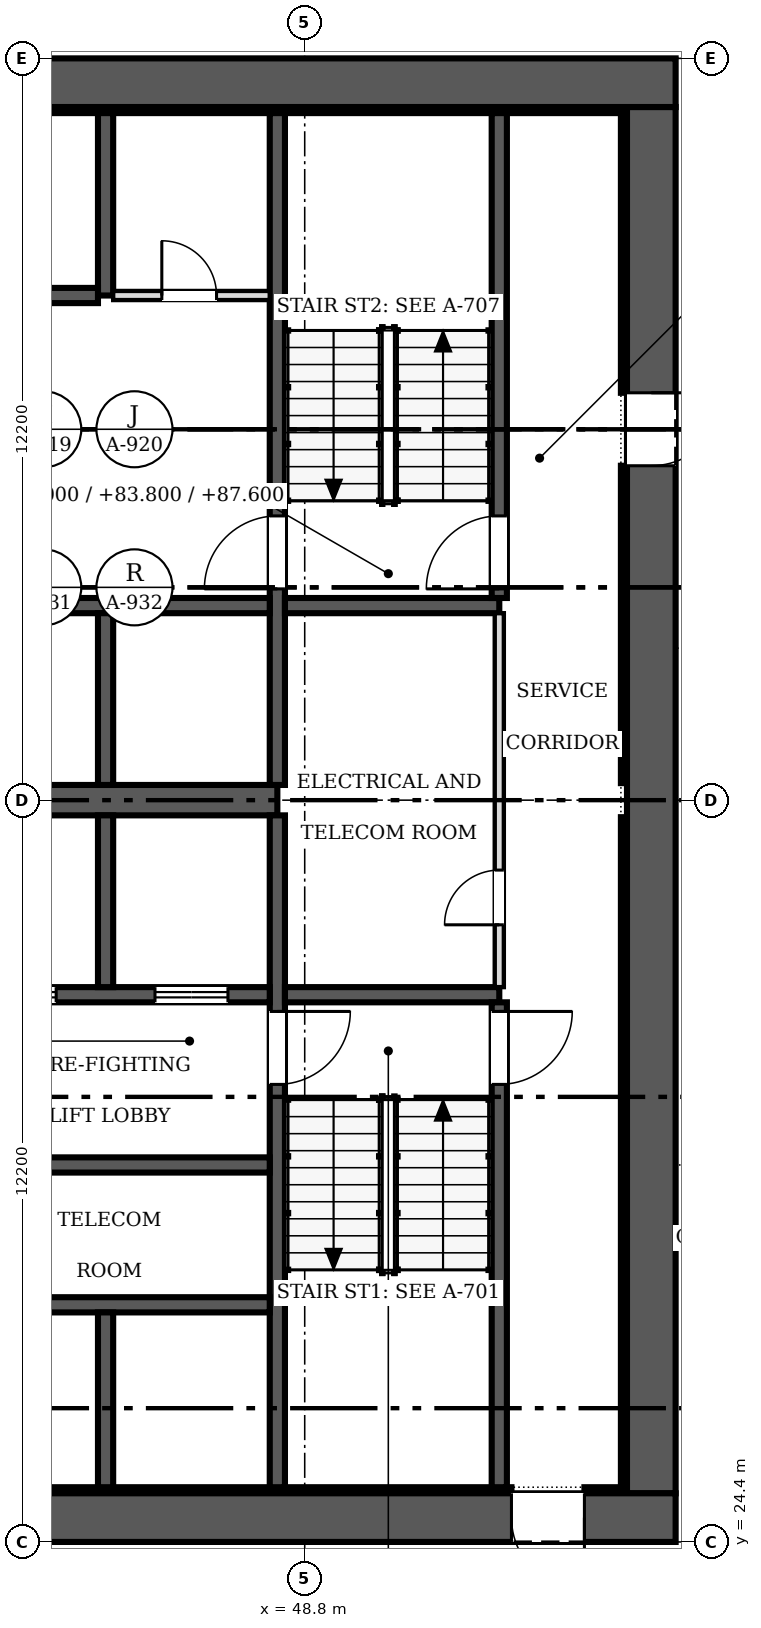
"""IFC4 building model, lengths in metres.
Left out: names, types, materials, properties, quantities, classifications, styles, units other than length and angle.
Written with IfcOpenShell. Run it as: python <this file> out.ifc"""

import sys

from ifc_helpers import new_model, si_unit, direction, frame, frame_2d, origin, place, context, subcontext, project, spatial, rectangle, extrude, source, transform, mapped, element, fill, save


model = new_model("IFC4")
c1 = context("Model", 3, precision=1e-05, world=origin(), true_north=direction((0.0, 1.0)))
c2 = subcontext(c1, "Body", "Model", "MODEL_VIEW")
j1 = project(units=[si_unit("LENGTHUNIT", "METRE"), si_unit("PLANEANGLEUNIT", "RADIAN")], contexts=[c1])
p1 = place(None, origin())
s1 = spatial("IfcSite", under=j1, at=p1, CompositionType="ELEMENT")
p2 = place(p1, origin())
s2 = spatial("IfcBuilding", under=s1, at=p2, CompositionType="ELEMENT")
p3 = place(p2, frame((0.0, 0.0, 80.0)))
s3 = spatial("IfcBuildingStorey", under=s2, at=p3, CompositionType="ELEMENT", Elevation=80.0)
p4 = place(p3, frame((54.9, 24.8, 0.0), z_axis=(0.0, 0.0, 1.0), x_axis=(-1.0, 0.0, 0.0)))
e1 = element("IfcWall", 1, at=p4, inside=s3, PredefinedType="SHEAR", context=c2, shape_type="SweptSolid", body=[
    extrude(rectangle(XDim=24.4, YDim=0.8, at=frame_2d((12.2, 0.0))), origin(), (0.0, 0.0, 1.0), 3.8),
])
m1 = source(origin(), c2, "Body", "SweptSolid", [
    extrude(rectangle(XDim=1.2, YDim=2.1, at=frame_2d((0.6, 1.05))), frame((0.0, 0.41, 0.0), z_axis=(0.0, -1.0, 0.0), x_axis=(1.0, 0.0, 0.0)), (0.0, 0.0, 1.0), 0.82),
])
p5 = place(p4, frame((1.5, 0.0, 0.0)))
e2 = element("IfcOpeningElement", 2, at=p5, cuts=e1, PredefinedType="OPENING", context=c2, shape_type="MappedRepresentation", body=[
    mapped(m1, transform((0.0, 0.0, 0.0), scale=1.0)),
])
p6 = place(p3, frame((30.5, 48.4, 0.0), z_axis=(0.0, 0.0, 1.0), x_axis=(1.0, 0.0, 0.0)))
e3 = element("IfcWall", 3, at=p6, inside=s3, PredefinedType="SHEAR", context=c2, shape_type="SweptSolid", body=[
    extrude(rectangle(XDim=24.4, YDim=0.8, at=frame_2d((12.2, 0.0))), origin(), (0.0, 0.0, 1.0), 3.8),
])
p7 = place(p3, frame((54.5, 48.0, 0.0), z_axis=(0.0, 0.0, 1.0), x_axis=(0.0, -1.0, 0.0)))
e4 = element("IfcWall", 4, at=p7, inside=s3, PredefinedType="SHEAR", context=c2, shape_type="SweptSolid", body=[
    extrude(rectangle(XDim=22.8, YDim=0.8, at=frame_2d((11.4, 0.0))), origin(), (0.0, 0.0, 1.0), 3.8),
])
p8 = place(p7, frame((4.7, 0.0, 0.0)))
e5 = element("IfcOpeningElement", 5, at=p8, cuts=e4, PredefinedType="OPENING", context=c2, shape_type="MappedRepresentation", body=[
    mapped(m1, transform((0.0, 0.0, 0.0), scale=1.0)),
])
p9 = place(p3, frame((31.3, 25.25, 0.0), z_axis=(0.0, 0.0, 1.0), x_axis=(1.0, 0.0, 0.0)))
e6 = element("IfcWall", 6, at=p9, inside=s3, PredefinedType="SOLIDWALL", context=c2, shape_type="SweptSolid", body=[
    extrude(rectangle(XDim=20.9, YDim=0.1, at=frame_2d((10.45, 0.0))), origin(), (0.0, 0.0, 1.0), 3.8),
])
p10 = place(p3, frame((53.4, 25.25, 0.0), z_axis=(0.0, 0.0, 1.0), x_axis=(1.0, 0.0, 0.0)))
e7 = element("IfcWall", 7, at=p10, inside=s3, PredefinedType="SOLIDWALL", context=c2, shape_type="SweptSolid", body=[
    extrude(rectangle(XDim=0.7, YDim=0.1, at=frame_2d((0.35, 0.0))), origin(), (0.0, 0.0, 1.0), 3.8),
])
p11 = place(p3, frame((31.3, 47.95, 0.0), z_axis=(0.0, 0.0, 1.0), x_axis=(1.0, 0.0, 0.0)))
e8 = element("IfcWall", 8, at=p11, inside=s3, PredefinedType="SOLIDWALL", context=c2, shape_type="SweptSolid", body=[
    extrude(rectangle(XDim=22.8, YDim=0.1, at=frame_2d((11.4, 0.0))), origin(), (0.0, 0.0, 1.0), 3.8),
])
p12 = place(p3, frame((54.05, 25.3, 0.0), z_axis=(0.0, 0.0, 1.0), x_axis=(0.0, 1.0, 0.0)))
e9 = element("IfcWall", 9, at=p12, inside=s3, PredefinedType="SOLIDWALL", context=c2, shape_type="SweptSolid", body=[
    extrude(rectangle(XDim=11.02, YDim=0.1, at=frame_2d((5.51, 0.0))), origin(), (0.0, 0.0, 1.0), 3.8),
])
p13 = place(p3, frame((54.05, 36.88, 0.0), z_axis=(0.0, 0.0, 1.0), x_axis=(0.0, 1.0, 0.0)))
e10 = element("IfcWall", 10, at=p13, inside=s3, PredefinedType="SOLIDWALL", context=c2, shape_type="SweptSolid", body=[
    extrude(rectangle(XDim=5.22, YDim=0.1, at=frame_2d((2.61, 0.0))), origin(), (0.0, 0.0, 1.0), 3.8),
])
p14 = place(p3, frame((54.05, 43.3, 0.0), z_axis=(0.0, 0.0, 1.0), x_axis=(0.0, 1.0, 0.0)))
e11 = element("IfcWall", 11, at=p14, inside=s3, PredefinedType="SOLIDWALL", context=c2, shape_type="SweptSolid", body=[
    extrude(rectangle(XDim=4.6, YDim=0.1, at=frame_2d((2.3, 0.0))), origin(), (0.0, 0.0, 1.0), 3.8),
])
p15 = place(p3, frame((31.4, 36.6, 0.0), z_axis=(0.0, 0.0, 1.0), x_axis=(1.0, 0.0, 0.0)))
e12 = element("IfcWall", 12, at=p15, inside=s3, PredefinedType="SHEAR", context=c2, shape_type="SweptSolid", body=[
    extrude(rectangle(XDim=16.95, YDim=0.5, at=frame_2d((8.475, 0.0))), origin(), (0.0, 0.0, 1.0), 3.8),
])
p16 = place(p3, frame((48.35, 36.35, 0.0), z_axis=(0.0, 0.0, 1.0), x_axis=(0.0, -1.0, 0.0)))
e13 = element("IfcWall", 13, at=p16, inside=s3, PredefinedType="SOLIDWALL", context=c2, shape_type="SweptSolid", body=[
    extrude(rectangle(XDim=11.05, YDim=0.25, at=frame_2d((5.525, 0.0))), origin(), (0.0, 0.0, 1.0), 3.8),
])
m2 = source(origin(), c2, "Body", "SweptSolid", [
    extrude(rectangle(XDim=1.2, YDim=2.1, at=frame_2d((0.6, 1.05))), frame((0.0, 0.135, 0.0), z_axis=(0.0, -1.0, 0.0), x_axis=(1.0, 0.0, 0.0)), (0.0, 0.0, 1.0), 0.27),
])
p17 = place(p16, frame((3.225, 0.0, 0.0)))
e14 = element("IfcOpeningElement", 14, at=p17, cuts=e13, PredefinedType="OPENING", context=c2, shape_type="MappedRepresentation", body=[
    mapped(m2, transform((0.0, 0.0, 0.0), scale=1.0)),
])
p18 = place(p3, frame((48.35, 47.9, 0.0), z_axis=(0.0, 0.0, 1.0), x_axis=(0.0, -1.0, 0.0)))
e15 = element("IfcWall", 15, at=p18, inside=s3, PredefinedType="SOLIDWALL", context=c2, shape_type="SweptSolid", body=[
    extrude(rectangle(XDim=11.05, YDim=0.25, at=frame_2d((5.525, 0.0))), origin(), (0.0, 0.0, 1.0), 3.8),
])
p19 = place(p18, frame((6.625, 0.0, 0.0)))
e16 = element("IfcOpeningElement", 16, at=p19, cuts=e15, PredefinedType="OPENING", context=c2, shape_type="MappedRepresentation", body=[
    mapped(m2, transform((0.0, 0.0, 0.0), scale=1.0)),
])
p20 = place(p3, frame((48.225, 33.4, 0.0), z_axis=(0.0, 0.0, 1.0), x_axis=(-1.0, 0.0, 0.0)))
e17 = element("IfcWall", 17, at=p20, inside=s3, PredefinedType="SOLIDWALL", context=c2, shape_type="SweptSolid", body=[
    extrude(rectangle(XDim=5.275, YDim=0.25, at=frame_2d((2.638, 0.0))), origin(), (0.0, 0.0, 1.0), 3.8),
])
p21 = place(p20, frame((3.512, 0.0, 0.0)))
e18 = element("IfcOpeningElement", 18, at=p21, cuts=e17, PredefinedType="OPENING", context=c2, shape_type="MappedRepresentation", body=[
    mapped(m2, transform((0.0, 0.0, 0.0), scale=1.0)),
])
p22 = place(p20, frame((0.688, 0.0, 0.0)))
e19 = element("IfcOpeningElement", 19, at=p22, cuts=e17, PredefinedType="OPENING", context=c2, shape_type="MappedRepresentation", body=[
    mapped(m2, transform((0.0, 0.0, 0.0), scale=1.0)),
])
p23 = place(p3, frame((48.475, 33.4, 0.0), z_axis=(0.0, 0.0, 1.0), x_axis=(1.0, 0.0, 0.0)))
e20 = element("IfcWall", 20, at=p23, inside=s3, PredefinedType="SOLIDWALL", context=c2, shape_type="SweptSolid", body=[
    extrude(rectangle(XDim=3.525, YDim=0.25, at=frame_2d((1.762, 0.0))), origin(), (0.0, 0.0, 1.0), 3.8),
])
for number, where, z_axis, x_axis in (
    (21, (42.95, 28.3, 0.0), (0.0, 0.0, 1.0), (1.0, 0.0, 0.0)),
    (22, (42.95, 39.8, 0.0), (0.0, 0.0, 1.0), (1.0, 0.0, 0.0)),
):
    element("IfcWall", number, at=place(p3, frame(where, z_axis=z_axis, x_axis=x_axis)), inside=s3, PredefinedType="SOLIDWALL", context=c2, shape_type="SweptSolid", body=[
        extrude(rectangle(XDim=5.275, YDim=0.25, at=frame_2d((2.638, 0.0))), origin(), (0.0, 0.0, 1.0), 3.8),
    ])
p24 = place(p3, frame((48.475, 39.8, 0.0), z_axis=(0.0, 0.0, 1.0), x_axis=(1.0, 0.0, 0.0)))
e23 = element("IfcWall", 23, at=p24, inside=s3, PredefinedType="SOLIDWALL", context=c2, shape_type="SweptSolid", body=[
    extrude(rectangle(XDim=3.525, YDim=0.25, at=frame_2d((1.762, 0.0))), origin(), (0.0, 0.0, 1.0), 3.8),
])
p25 = place(p3, frame((52.0, 25.3, 0.0), z_axis=(0.0, 0.0, 1.0), x_axis=(0.0, 1.0, 0.0)))
e24 = element("IfcWall", 24, at=p25, inside=s3, PredefinedType="SOLIDWALL", context=c2, shape_type="SweptSolid", body=[
    extrude(rectangle(XDim=7.975, YDim=0.25, at=frame_2d((3.987, 0.0))), origin(), (0.0, 0.0, 1.0), 3.8),
])
p26 = place(p25, frame((6.625, 0.0, 0.0)))
e25 = element("IfcOpeningElement", 25, at=p26, cuts=e24, PredefinedType="OPENING", context=c2, shape_type="MappedRepresentation", body=[
    mapped(m2, transform((0.0, 0.0, 0.0), scale=1.0)),
])
p27 = place(p3, frame((52.0, 39.925, 0.0), z_axis=(0.0, 0.0, 1.0), x_axis=(0.0, 1.0, 0.0)))
e26 = element("IfcWall", 26, at=p27, inside=s3, PredefinedType="SOLIDWALL", context=c2, shape_type="SweptSolid", body=[
    extrude(rectangle(XDim=7.975, YDim=0.25, at=frame_2d((3.987, 0.0))), origin(), (0.0, 0.0, 1.0), 3.8),
])
p28 = place(p27, frame((0.15, 0.0, 0.0)))
e27 = element("IfcOpeningElement", 27, at=p28, cuts=e26, PredefinedType="OPENING", context=c2, shape_type="MappedRepresentation", body=[
    mapped(m2, transform((0.0, 0.0, 0.0), scale=1.0)),
])
p29 = place(p3, frame((45.525, 33.525, 0.0), z_axis=(0.0, 0.0, 1.0), x_axis=(0.0, 1.0, 0.0)))
e28 = element("IfcWall", 28, at=p29, inside=s3, PredefinedType="SOLIDWALL", context=c2, shape_type="SweptSolid", body=[
    extrude(rectangle(XDim=2.825, YDim=0.25, at=frame_2d((1.413, 0.0))), origin(), (0.0, 0.0, 1.0), 3.8),
])
p30 = place(p3, frame((45.525, 36.85, 0.0), z_axis=(0.0, 0.0, 1.0), x_axis=(0.0, 1.0, 0.0)))
e29 = element("IfcWall", 29, at=p30, inside=s3, PredefinedType="SOLIDWALL", context=c2, shape_type="SweptSolid", body=[
    extrude(rectangle(XDim=2.825, YDim=0.25, at=frame_2d((1.413, 0.0))), origin(), (0.0, 0.0, 1.0), 3.8),
])
p31 = place(p3, frame((42.95, 30.6, 0.0), z_axis=(0.0, 0.0, 1.0), x_axis=(1.0, 0.0, 0.0)))
e30 = element("IfcWall", 30, at=p31, inside=s3, PredefinedType="SOLIDWALL", context=c2, shape_type="SweptSolid", body=[
    extrude(rectangle(XDim=5.275, YDim=0.25, at=frame_2d((2.638, 0.0))), origin(), (0.0, 0.0, 1.0), 3.8),
])
p32 = place(p3, frame((45.525, 25.3, 0.0), z_axis=(0.0, 0.0, 1.0), x_axis=(0.0, 1.0, 0.0)))
e31 = element("IfcWall", 31, at=p32, inside=s3, PredefinedType="SOLIDWALL", context=c2, shape_type="SweptSolid", body=[
    extrude(rectangle(XDim=2.875, YDim=0.25, at=frame_2d((1.438, 0.0))), origin(), (0.0, 0.0, 1.0), 3.8),
])
p33 = place(p3, frame((45.525, 44.9, 0.0), z_axis=(0.0, 0.0, 1.0), x_axis=(0.0, 1.0, 0.0)))
e32 = element("IfcWall", 32, at=p33, inside=s3, PredefinedType="SOLIDWALL", context=c2, shape_type="SweptSolid", body=[
    extrude(rectangle(XDim=3.0, YDim=0.25, at=frame_2d((1.5, 0.0))), origin(), (0.0, 0.0, 1.0), 3.8),
])
p34 = place(p3, frame((42.95, 44.9, 0.0), z_axis=(0.0, 0.0, 1.0), x_axis=(1.0, 0.0, 0.0)))
e33 = element("IfcWall", 33, at=p34, inside=s3, PredefinedType="SOLIDWALL", context=c2, shape_type="SweptSolid", body=[
    extrude(rectangle(XDim=2.45, YDim=0.25, at=frame_2d((1.225, 0.0))), origin(), (0.0, 0.0, 1.0), 3.8),
])
p35 = place(p3, frame((52.0, 33.525, 0.0), z_axis=(0.0, 0.0, 1.0), x_axis=(0.0, 1.0, 0.0)))
e34 = element("IfcWall", 34, at=p35, inside=s3, PredefinedType="PARTITIONING", context=c2, shape_type="SweptSolid", body=[
    extrude(rectangle(XDim=6.15, YDim=0.15, at=frame_2d((3.075, 0.0))), origin(), (0.0, 0.0, 1.0), 3.6),
])
m3 = source(origin(), c2, "Body", "SweptSolid", [
    extrude(rectangle(XDim=0.9, YDim=2.1, at=frame_2d((0.45, 1.05))), frame((0.0, 0.085, 0.0), z_axis=(0.0, -1.0, 0.0), x_axis=(1.0, 0.0, 0.0)), (0.0, 0.0, 1.0), 0.17),
])
p36 = place(p35, frame((1.025, 0.0, 0.0)))
e35 = element("IfcOpeningElement", 35, at=p36, cuts=e34, PredefinedType="OPENING", context=c2, shape_type="MappedRepresentation", body=[
    mapped(m3, transform((0.0, 0.0, 0.0), scale=1.0)),
])
p37 = place(p3, frame((45.65, 44.9, 0.0), z_axis=(0.0, 0.0, 1.0), x_axis=(1.0, 0.0, 0.0)))
e36 = element("IfcWall", 36, at=p37, inside=s3, PredefinedType="PARTITIONING", context=c2, shape_type="SweptSolid", body=[
    extrude(rectangle(XDim=2.575, YDim=0.15, at=frame_2d((1.288, 0.0))), origin(), (0.0, 0.0, 1.0), 3.6),
])
p38 = place(p37, frame((0.8, 0.0, 0.0)))
e37 = element("IfcOpeningElement", 37, at=p38, cuts=e36, PredefinedType="OPENING", context=c2, shape_type="MappedRepresentation", body=[
    mapped(m3, transform((0.0, 0.0, 0.0), scale=1.0)),
])
m4 = source(origin(), c2, "Body", "SweptSolid", [
    extrude(rectangle(XDim=1.2, YDim=2.1, at=frame_2d((0.6, 1.05))), frame((0.0, 0.025, 0.0), z_axis=(0.0, -1.0, 0.0), x_axis=(1.0, 0.0, 0.0)), (0.0, 0.0, 1.0), 0.05),
])
p39 = place(p5, origin())
e38 = element("IfcDoor", 38, at=p39, inside=s3, OperationType="SINGLE_SWING_LEFT", PredefinedType="DOOR", context=c2, shape_type="MappedRepresentation", body=[
    mapped(m4, transform((0.0, 0.0, 0.0), scale=1.0)),
])
fill(e2, e38)
p40 = place(p8, origin())
e39 = element("IfcDoor", 39, at=p40, inside=s3, OperationType="SINGLE_SWING_LEFT", PredefinedType="DOOR", context=c2, shape_type="MappedRepresentation", body=[
    mapped(m4, transform((0.0, 0.0, 0.0), scale=1.0)),
])
fill(e5, e39)
p41 = place(p17, origin())
e40 = element("IfcDoor", 40, at=p41, inside=s3, OperationType="SINGLE_SWING_LEFT", PredefinedType="DOOR", context=c2, shape_type="MappedRepresentation", body=[
    mapped(m4, transform((0.0, 0.0, 0.0), scale=1.0)),
])
fill(e14, e40)
p42 = place(p19, origin())
e41 = element("IfcDoor", 41, at=p42, inside=s3, OperationType="SINGLE_SWING_RIGHT", PredefinedType="DOOR", context=c2, shape_type="MappedRepresentation", body=[
    mapped(m4, transform((0.0, 0.0, 0.0), scale=1.0)),
])
fill(e16, e41)
p43 = place(p21, origin())
e42 = element("IfcDoor", 42, at=p43, inside=s3, OperationType="DOUBLE_DOOR_SLIDING", PredefinedType="DOOR", context=c2, shape_type="MappedRepresentation", body=[
    mapped(m4, transform((0.0, 0.0, 0.0), scale=1.0)),
])
fill(e18, e42)
p44 = place(p22, origin())
e43 = element("IfcDoor", 43, at=p44, inside=s3, OperationType="DOUBLE_DOOR_SLIDING", PredefinedType="DOOR", context=c2, shape_type="MappedRepresentation", body=[
    mapped(m4, transform((0.0, 0.0, 0.0), scale=1.0)),
])
fill(e19, e43)
p45 = place(p26, origin())
e44 = element("IfcDoor", 44, at=p45, inside=s3, OperationType="SINGLE_SWING_RIGHT", PredefinedType="DOOR", context=c2, shape_type="MappedRepresentation", body=[
    mapped(m4, transform((0.0, 0.0, 0.0), scale=1.0)),
])
fill(e25, e44)
p46 = place(p28, origin())
e45 = element("IfcDoor", 45, at=p46, inside=s3, OperationType="SINGLE_SWING_LEFT", PredefinedType="DOOR", context=c2, shape_type="MappedRepresentation", body=[
    mapped(m4, transform((0.0, 0.0, 0.0), scale=1.0)),
])
fill(e27, e45)
m5 = source(origin(), c2, "Body", "SweptSolid", [
    extrude(rectangle(XDim=0.9, YDim=2.1, at=frame_2d((0.45, 1.05))), frame((0.0, 0.025, 0.0), z_axis=(0.0, -1.0, 0.0), x_axis=(1.0, 0.0, 0.0)), (0.0, 0.0, 1.0), 0.05),
])
p47 = place(p36, origin())
e46 = element("IfcDoor", 46, at=p47, inside=s3, OperationType="SINGLE_SWING_LEFT", PredefinedType="DOOR", context=c2, shape_type="MappedRepresentation", body=[
    mapped(m5, transform((0.0, 0.0, 0.0), scale=1.0)),
])
fill(e35, e46)
p48 = place(p38, origin())
e47 = element("IfcDoor", 47, at=p48, inside=s3, OperationType="SINGLE_SWING_LEFT", PredefinedType="DOOR", context=c2, shape_type="MappedRepresentation", body=[
    mapped(m5, transform((0.0, 0.0, 0.0), scale=1.0)),
])
fill(e37, e47)
save(model, sys.argv[1])
